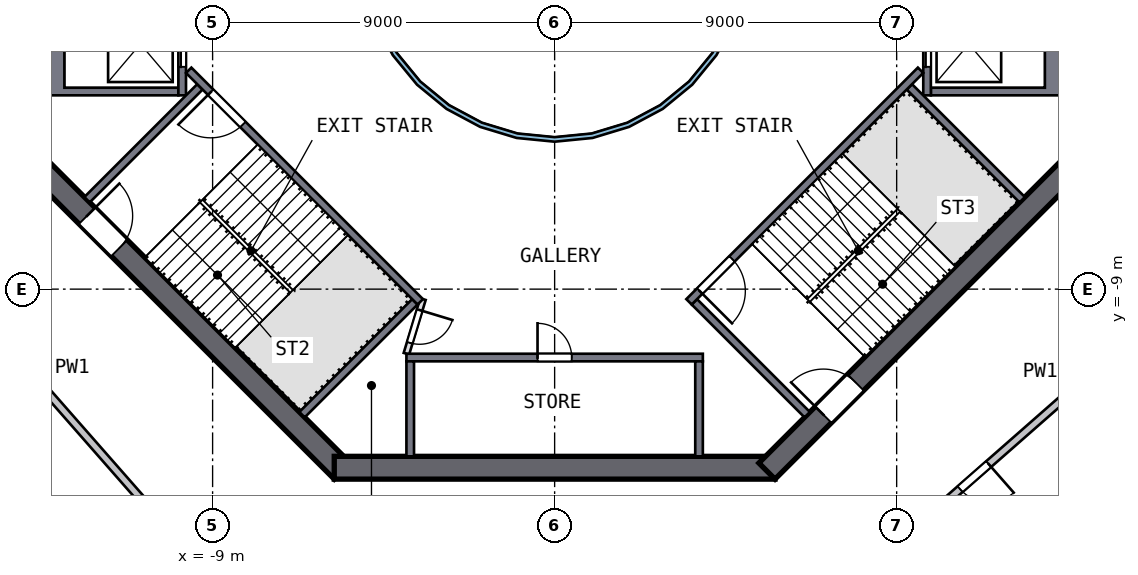
"""IFC4 building model, lengths in metres.
Left out: names, types, materials, properties, quantities, classifications, styles, units other than length and angle.
Written with IfcOpenShell. Run it as: python <this file> out.ifc"""

import sys

from ifc_helpers import new_model, si_unit, direction, frame, frame_2d, origin, place, context, subcontext, project, spatial, polyline, rectangle, outline, extrude, element, fill, save


model = new_model("IFC4")
c1 = context("Model", 3, precision=1e-05, world=origin(), true_north=direction((0.0, 1.0)))
c2 = subcontext(c1, "Body", "Model", "MODEL_VIEW")
j1 = project(units=[si_unit("LENGTHUNIT", "METRE"), si_unit("PLANEANGLEUNIT", "RADIAN")], contexts=[c1])
p1 = place(None, origin())
s1 = spatial("IfcSite", under=j1, at=p1, CompositionType="ELEMENT")
p2 = place(p1, origin())
s2 = spatial("IfcBuilding", under=s1, at=p2, CompositionType="ELEMENT")
p3 = place(p2, frame((0.0, 0.0, 201.0)))
s3 = spatial("IfcBuildingStorey", under=s2, at=p3, CompositionType="ELEMENT", Elevation=201.0)
p4 = place(p3, frame((-13.788, -5.587, 0.0), z_axis=(0.0, 0.0, 1.0), x_axis=(0.707106781, -0.707106781, 0.0)))
e1 = element("IfcWall", 1, at=p4, inside=s3, PredefinedType="SHEAR", context=c2, shape_type="SweptSolid", body=[
    extrude(rectangle(XDim=11.598, YDim=0.6, at=frame_2d((5.799, 0.0))), origin(), (0.0, 0.0, 1.0), 4.5),
])
p5 = place(p4, frame((2.099, 0.0, 0.0)))
e2 = element("IfcOpeningElement", 2, at=p5, cuts=e1, PredefinedType="OPENING", context=c2, shape_type="SweptSolid", body=[
    extrude(rectangle(XDim=1.2, YDim=2.1, at=frame_2d((0.6, 1.05))), frame((0.0, 0.31, 0.0), z_axis=(0.0, -1.0, 0.0), x_axis=(1.0, 0.0, 0.0)), (0.0, 0.0, 1.0), 0.62),
])
p6 = place(p3, frame((-5.799, -13.7, 0.0), z_axis=(0.0, 0.0, 1.0), x_axis=(1.0, 0.0, 0.0)))
e3 = element("IfcWall", 3, at=p6, inside=s3, PredefinedType="SHEAR", context=c2, shape_type="SweptSolid", body=[
    extrude(rectangle(XDim=11.598, YDim=0.6, at=frame_2d((5.799, 0.0))), origin(), (0.0, 0.0, 1.0), 4.5),
])
p7 = place(p3, frame((5.587, -13.788, 0.0), z_axis=(0.0, 0.0, 1.0), x_axis=(0.707106781, 0.707106781, 0.0)))
e4 = element("IfcWall", 4, at=p7, inside=s3, PredefinedType="SHEAR", context=c2, shape_type="SweptSolid", body=[
    extrude(rectangle(XDim=11.598, YDim=0.6, at=frame_2d((5.799, 0.0))), origin(), (0.0, 0.0, 1.0), 4.5),
])
p8 = place(p7, frame((2.099, 0.0, 0.0)))
e5 = element("IfcOpeningElement", 5, at=p8, cuts=e4, PredefinedType="OPENING", context=c2, shape_type="SweptSolid", body=[
    extrude(rectangle(XDim=1.2, YDim=2.1, at=frame_2d((0.6, 1.05))), frame((0.0, 0.31, 0.0), z_axis=(0.0, -1.0, 0.0), x_axis=(1.0, 0.0, 0.0)), (0.0, 0.0, 1.0), 0.62),
])
p9 = place(p3, origin())
e6 = element("IfcWall", 6, at=p9, inside=s3, PredefinedType="SOLIDWALL", context=c2, shape_type="SweptSolid", body=[
    extrude(outline(polyline([(13.4, -3.9), (9.9, -3.9), (9.9, -3.7), (12.9, -3.7), (12.9, -1.4), (9.9, -1.4), (9.9, -1.2), (13.4, -1.2), (13.4, -3.9)])), origin(), (0.0, 0.0, 1.0), 4.19),
])
p10 = place(p3, frame((9.8, -1.2, 0.0), z_axis=(0.0, 0.0, 1.0), x_axis=(0.0, -1.0, 0.0)))
e7 = element("IfcWall", 7, at=p10, inside=s3, PredefinedType="SOLIDWALL", context=c2, shape_type="SweptSolid", body=[
    extrude(rectangle(XDim=2.7, YDim=0.2, at=frame_2d((1.35, 0.0))), origin(), (0.0, 0.0, 1.0), 4.19),
])
p11 = place(p10, frame((0.75, 0.0, 0.0)))
e8 = element("IfcOpeningElement", 8, at=p11, cuts=e7, PredefinedType="OPENING", context=c2, shape_type="SweptSolid", body=[
    extrude(rectangle(XDim=1.2, YDim=2.1, at=frame_2d((0.6, 1.05))), frame((0.0, 0.11, 0.0), z_axis=(0.0, -1.0, 0.0), x_axis=(1.0, 0.0, 0.0)), (0.0, 0.0, 1.0), 0.22),
])
p12 = place(p3, origin())
e9 = element("IfcWall", 9, at=p12, inside=s3, PredefinedType="SOLIDWALL", context=c2, shape_type="SweptSolid", body=[
    extrude(outline(polyline([(-13.4, -3.9), (-13.4, -1.2), (-9.9, -1.2), (-9.9, -1.4), (-12.9, -1.4), (-12.9, -3.7), (-9.9, -3.7), (-9.9, -3.9), (-13.4, -3.9)])), origin(), (0.0, 0.0, 1.0), 4.19),
])
p13 = place(p3, frame((-9.8, -1.2, 0.0), z_axis=(0.0, 0.0, 1.0), x_axis=(0.0, -1.0, 0.0)))
e10 = element("IfcWall", 10, at=p13, inside=s3, PredefinedType="SOLIDWALL", context=c2, shape_type="SweptSolid", body=[
    extrude(rectangle(XDim=2.7, YDim=0.2, at=frame_2d((1.35, 0.0))), origin(), (0.0, 0.0, 1.0), 4.19),
])
p14 = place(p13, frame((0.75, 0.0, 0.0)))
e11 = element("IfcOpeningElement", 11, at=p14, cuts=e10, PredefinedType="OPENING", context=c2, shape_type="SweptSolid", body=[
    extrude(rectangle(XDim=1.2, YDim=2.1, at=frame_2d((0.6, 1.05))), frame((0.0, 0.11, 0.0), z_axis=(0.0, -1.0, 0.0), x_axis=(1.0, 0.0, 0.0)), (0.0, 0.0, 1.0), 0.22),
])
p15 = place(p3, frame((-3.9, -10.8, 0.0), z_axis=(0.0, 0.0, 1.0), x_axis=(1.0, 0.0, 0.0)))
e12 = element("IfcWall", 12, at=p15, inside=s3, PredefinedType="SOLIDWALL", context=c2, shape_type="SweptSolid", body=[
    extrude(rectangle(XDim=7.8, YDim=0.2, at=frame_2d((3.9, 0.0))), origin(), (0.0, 0.0, 1.0), 4.19),
])
p16 = place(p15, frame((3.45, 0.0, 0.0)))
e13 = element("IfcOpeningElement", 13, at=p16, cuts=e12, PredefinedType="OPENING", context=c2, shape_type="SweptSolid", body=[
    extrude(rectangle(XDim=0.9, YDim=2.1, at=frame_2d((0.45, 1.05))), frame((0.0, 0.11, 0.0), z_axis=(0.0, -1.0, 0.0), x_axis=(1.0, 0.0, 0.0)), (0.0, 0.0, 1.0), 0.22),
])
for number, where, z_axis, x_axis in (
    (14, (-3.8, -10.9, 0.0), (0.0, 0.0, 1.0), (0.0, -1.0, 0.0)),
    (15, (3.8, -10.9, 0.0), (0.0, 0.0, 1.0), (0.0, -1.0, 0.0)),
):
    element("IfcWall", number, at=place(p3, frame(where, z_axis=z_axis, x_axis=x_axis)), inside=s3, PredefinedType="SOLIDWALL", context=c2, shape_type="SweptSolid", body=[
        extrude(rectangle(XDim=2.5, YDim=0.2, at=frame_2d((1.25, 0.0))), origin(), (0.0, 0.0, 1.0), 4.19),
    ])
p17 = place(p3, frame((-3.535, -9.334, 0.0), z_axis=(0.0, 0.0, 1.0), x_axis=(-0.707120946, 0.707092617, 0.0)))
e16 = element("IfcWall", 16, at=p17, inside=s3, PredefinedType="SOLIDWALL", context=c2, shape_type="SweptSolid", body=[
    extrude(rectangle(XDim=8.618, YDim=0.2, at=frame_2d((4.309, 0.0))), origin(), (0.0, 0.0, 1.0), 4.19),
])
p18 = place(p17, frame((6.6, 0.0, 0.0)))
e17 = element("IfcOpeningElement", 17, at=p18, cuts=e16, PredefinedType="OPENING", context=c2, shape_type="SweptSolid", body=[
    extrude(rectangle(XDim=1.2, YDim=2.1, at=frame_2d((0.6, 1.05))), frame((0.0, 0.11, 0.0), z_axis=(0.0, -1.0, 0.0), x_axis=(1.0, 0.0, 0.0)), (0.0, 0.0, 1.0), 0.22),
])
for number, where, z_axis, x_axis in (
    (18, (-9.334, -3.677, 0.0), (0.0, 0.0, 1.0), (-0.707, -0.707, 0.0)),
    (19, (-3.677, -9.334, 0.0), (0.0, 0.0, 1.0), (-0.707, -0.707, 0.0)),
):
    element("IfcWall", number, at=place(p3, frame(where, z_axis=z_axis, x_axis=x_axis)), inside=s3, PredefinedType="SOLIDWALL", context=c2, shape_type="SweptSolid", body=[
        extrude(rectangle(XDim=4.2, YDim=0.2, at=frame_2d((2.1, 0.0))), origin(), (0.0, 0.0, 1.0), 4.19),
    ])
p19 = place(p3, frame((9.629, -3.24, 0.0), z_axis=(0.0, 0.0, 1.0), x_axis=(-0.707120946, -0.707092617, 0.0)))
e20 = element("IfcWall", 20, at=p19, inside=s3, PredefinedType="SOLIDWALL", context=c2, shape_type="SweptSolid", body=[
    extrude(rectangle(XDim=8.618, YDim=0.2, at=frame_2d((4.309, 0.0))), origin(), (0.0, 0.0, 1.0), 4.19),
])
p20 = place(p19, frame((7.018, 0.0, 0.0)))
e21 = element("IfcOpeningElement", 21, at=p20, cuts=e20, PredefinedType="OPENING", context=c2, shape_type="SweptSolid", body=[
    extrude(rectangle(XDim=1.2, YDim=2.1, at=frame_2d((0.6, 1.05))), frame((0.0, 0.11, 0.0), z_axis=(0.0, -1.0, 0.0), x_axis=(1.0, 0.0, 0.0)), (0.0, 0.0, 1.0), 0.22),
])
for number, where, z_axis, x_axis in (
    (22, (3.677, -9.334, 0.0), (0.0, 0.0, 1.0), (0.707, -0.707, 0.0)),
    (23, (9.334, -3.677, 0.0), (0.0, 0.0, 1.0), (0.707, -0.707, 0.0)),
):
    element("IfcWall", number, at=place(p3, frame(where, z_axis=z_axis, x_axis=x_axis)), inside=s3, PredefinedType="SOLIDWALL", context=c2, shape_type="SweptSolid", body=[
        extrude(rectangle(XDim=4.2, YDim=0.2, at=frame_2d((2.1, 0.0))), origin(), (0.0, 0.0, 1.0), 4.19),
    ])
p21 = place(p3, frame((-3.465, -9.263, 0.0), z_axis=(0.0, 0.0, 1.0), x_axis=(-0.289808785, -0.957084567, 0.0)))
e24 = element("IfcWall", 24, at=p21, inside=s3, PredefinedType="PARTITIONING", context=c2, shape_type="SweptSolid", body=[
    extrude(rectangle(XDim=1.501, YDim=0.15, at=frame_2d((0.75, 0.0))), origin(), (0.0, 0.0, 1.0), 4.19),
])
p22 = place(p21, frame((0.301, 0.0, 0.0)))
e25 = element("IfcOpeningElement", 25, at=p22, cuts=e24, PredefinedType="OPENING", context=c2, shape_type="SweptSolid", body=[
    extrude(rectangle(XDim=0.9, YDim=2.1, at=frame_2d((0.45, 1.05))), frame((0.0, 0.085, 0.0), z_axis=(0.0, -1.0, 0.0), x_axis=(1.0, 0.0, 0.0)), (0.0, 0.0, 1.0), 0.17),
])
p23 = place(p3, origin())
e26 = element("IfcWall", 26, at=p23, inside=s3, PredefinedType="SOLIDWALL", context=c2, shape_type="SweptSolid", body=[
    extrude(outline(polyline([(5.021, -0.999), (4.73, -1.959), (4.257, -2.844), (3.62, -3.62), (2.844, -4.257), (1.959, -4.73), (0.999, -5.021), (0.0, -5.12), (-0.999, -5.021), (-1.959, -4.73), (-2.844, -4.257), (-3.62, -3.62), (-4.257, -2.844), (-4.73, -1.959), (-5.021, -0.999), (-5.12, 0.0), (-5.021, 0.999), (-4.73, 1.959), (-4.257, 2.844), (-3.62, 3.62), (-2.844, 4.257), (-1.959, 4.73), (-0.999, 5.021), (0.0, 5.12), (0.999, 5.021), (1.959, 4.73), (2.844, 4.257), (3.62, 3.62), (4.257, 2.844), (4.73, 1.959), (5.021, 0.999), (5.12, 0.0), (5.021, -0.999)]), holes=[polyline([(4.904, 0.976), (4.619, 1.913), (4.157, 2.778), (3.535, 3.535), (2.778, 4.157), (1.913, 4.619), (0.976, 4.904), (0.0, 5.0), (-0.976, 4.904), (-1.913, 4.619), (-2.778, 4.157), (-3.535, 3.535), (-4.157, 2.778), (-4.619, 1.913), (-4.904, 0.976), (-5.0, 0.0), (-4.904, -0.976), (-4.619, -1.913), (-4.157, -2.778), (-3.535, -3.535), (-2.778, -4.157), (-1.913, -4.619), (-0.976, -4.904), (0.0, -5.0), (0.976, -4.904), (1.913, -4.619), (2.778, -4.157), (3.535, -3.535), (4.157, -2.778), (4.619, -1.913), (4.904, -0.976), (5.0, 0.0), (4.904, 0.976)])]), origin(), (0.0, 0.0, 1.0), 4.19),
])
p24 = place(p3, frame((-16.484, -8.14, 0.0), z_axis=(0.0, 0.0, 1.0), x_axis=(0.659731564, -0.75150134, 0.0)))
e27 = element("IfcWall", 27, at=p24, inside=s3, PredefinedType="SOLIDWALL", context=c2, shape_type="SweptSolid", body=[
    extrude(rectangle(XDim=9.516, YDim=0.2, at=frame_2d((4.758, 0.0))), origin(), (0.0, 0.0, 1.0), 4.19),
])
p25 = place(p3, frame((15.291, -10.206, 0.0), z_axis=(0.0, 0.0, 1.0), x_axis=(-0.75148862, -0.659746052, 0.0)))
e28 = element("IfcWall", 28, at=p25, inside=s3, PredefinedType="SOLIDWALL", context=c2, shape_type="SweptSolid", body=[
    extrude(rectangle(XDim=9.516, YDim=0.2, at=frame_2d((4.758, 0.0))), origin(), (0.0, 0.0, 1.0), 4.19),
])
p26 = place(p25, frame((5.15, 0.0, 0.0)))
e29 = element("IfcOpeningElement", 29, at=p26, cuts=e28, PredefinedType="OPENING", context=c2, shape_type="SweptSolid", body=[
    extrude(rectangle(XDim=1.0, YDim=2.1, at=frame_2d((0.5, 1.05))), frame((0.0, 0.11, 0.0), z_axis=(0.0, -1.0, 0.0), x_axis=(1.0, 0.0, 0.0)), (0.0, 0.0, 1.0), 0.22),
])
p27 = place(p16, origin())
e30 = element("IfcDoor", 30, at=p27, inside=s3, OperationType="SINGLE_SWING_LEFT", PredefinedType="DOOR", context=c2, shape_type="SweptSolid", body=[
    extrude(rectangle(XDim=0.9, YDim=2.1, at=frame_2d((0.45, 1.05))), frame((0.0, 0.025, 0.0), z_axis=(0.0, -1.0, 0.0), x_axis=(1.0, 0.0, 0.0)), (0.0, 0.0, 1.0), 0.05),
])
fill(e13, e30)
p28 = place(p11, origin())
e31 = element("IfcDoor", 31, at=p28, inside=s3, OperationType="DOUBLE_DOOR_SLIDING", PredefinedType="DOOR", context=c2, shape_type="SweptSolid", body=[
    extrude(rectangle(XDim=1.2, YDim=2.1, at=frame_2d((0.6, 1.05))), frame((0.0, 0.025, 0.0), z_axis=(0.0, -1.0, 0.0), x_axis=(1.0, 0.0, 0.0)), (0.0, 0.0, 1.0), 0.05),
])
fill(e8, e31)
p29 = place(p14, origin())
e32 = element("IfcDoor", 32, at=p29, inside=s3, OperationType="DOUBLE_DOOR_SLIDING", PredefinedType="DOOR", context=c2, shape_type="SweptSolid", body=[
    extrude(rectangle(XDim=1.2, YDim=2.1, at=frame_2d((0.6, 1.05))), frame((0.0, 0.025, 0.0), z_axis=(0.0, -1.0, 0.0), x_axis=(1.0, 0.0, 0.0)), (0.0, 0.0, 1.0), 0.05),
])
fill(e11, e32)
p30 = place(p18, origin())
e33 = element("IfcDoor", 33, at=p30, inside=s3, OperationType="SINGLE_SWING_RIGHT", PredefinedType="DOOR", context=c2, shape_type="SweptSolid", body=[
    extrude(rectangle(XDim=1.2, YDim=2.1, at=frame_2d((0.6, 1.05))), frame((0.0, 0.025, 0.0), z_axis=(0.0, -1.0, 0.0), x_axis=(1.0, 0.0, 0.0)), (0.0, 0.0, 1.0), 0.05),
])
fill(e17, e33)
p31 = place(p20, origin())
e34 = element("IfcDoor", 34, at=p31, inside=s3, OperationType="SINGLE_SWING_RIGHT", PredefinedType="DOOR", context=c2, shape_type="SweptSolid", body=[
    extrude(rectangle(XDim=1.2, YDim=2.1, at=frame_2d((0.6, 1.05))), frame((0.0, 0.025, 0.0), z_axis=(0.0, -1.0, 0.0), x_axis=(1.0, 0.0, 0.0)), (0.0, 0.0, 1.0), 0.05),
])
fill(e21, e34)
p32 = place(p5, origin())
e35 = element("IfcDoor", 35, at=p32, inside=s3, OperationType="SINGLE_SWING_LEFT", PredefinedType="DOOR", context=c2, shape_type="SweptSolid", body=[
    extrude(rectangle(XDim=1.2, YDim=2.1, at=frame_2d((0.6, 1.05))), frame((0.0, 0.025, 0.0), z_axis=(0.0, -1.0, 0.0), x_axis=(1.0, 0.0, 0.0)), (0.0, 0.0, 1.0), 0.05),
])
fill(e2, e35)
p33 = place(p8, origin())
e36 = element("IfcDoor", 36, at=p33, inside=s3, OperationType="SINGLE_SWING_LEFT", PredefinedType="DOOR", context=c2, shape_type="SweptSolid", body=[
    extrude(rectangle(XDim=1.2, YDim=2.1, at=frame_2d((0.6, 1.05))), frame((0.0, 0.025, 0.0), z_axis=(0.0, -1.0, 0.0), x_axis=(1.0, 0.0, 0.0)), (0.0, 0.0, 1.0), 0.05),
])
fill(e5, e36)
p34 = place(p22, origin())
e37 = element("IfcDoor", 37, at=p34, inside=s3, OperationType="SINGLE_SWING_LEFT", PredefinedType="DOOR", context=c2, shape_type="SweptSolid", body=[
    extrude(rectangle(XDim=0.9, YDim=2.1, at=frame_2d((0.45, 1.05))), frame((0.0, 0.025, 0.0), z_axis=(0.0, -1.0, 0.0), x_axis=(1.0, 0.0, 0.0)), (0.0, 0.0, 1.0), 0.05),
])
fill(e25, e37)
p35 = place(p26, origin())
e38 = element("IfcDoor", 38, at=p35, inside=s3, OperationType="SINGLE_SWING_LEFT", PredefinedType="DOOR", context=c2, shape_type="SweptSolid", body=[
    extrude(rectangle(XDim=1.0, YDim=2.1, at=frame_2d((0.5, 1.05))), frame((0.0, 0.025, 0.0), z_axis=(0.0, -1.0, 0.0), x_axis=(1.0, 0.0, 0.0)), (0.0, 0.0, 1.0), 0.05),
])
fill(e29, e38)
save(model, sys.argv[1])
